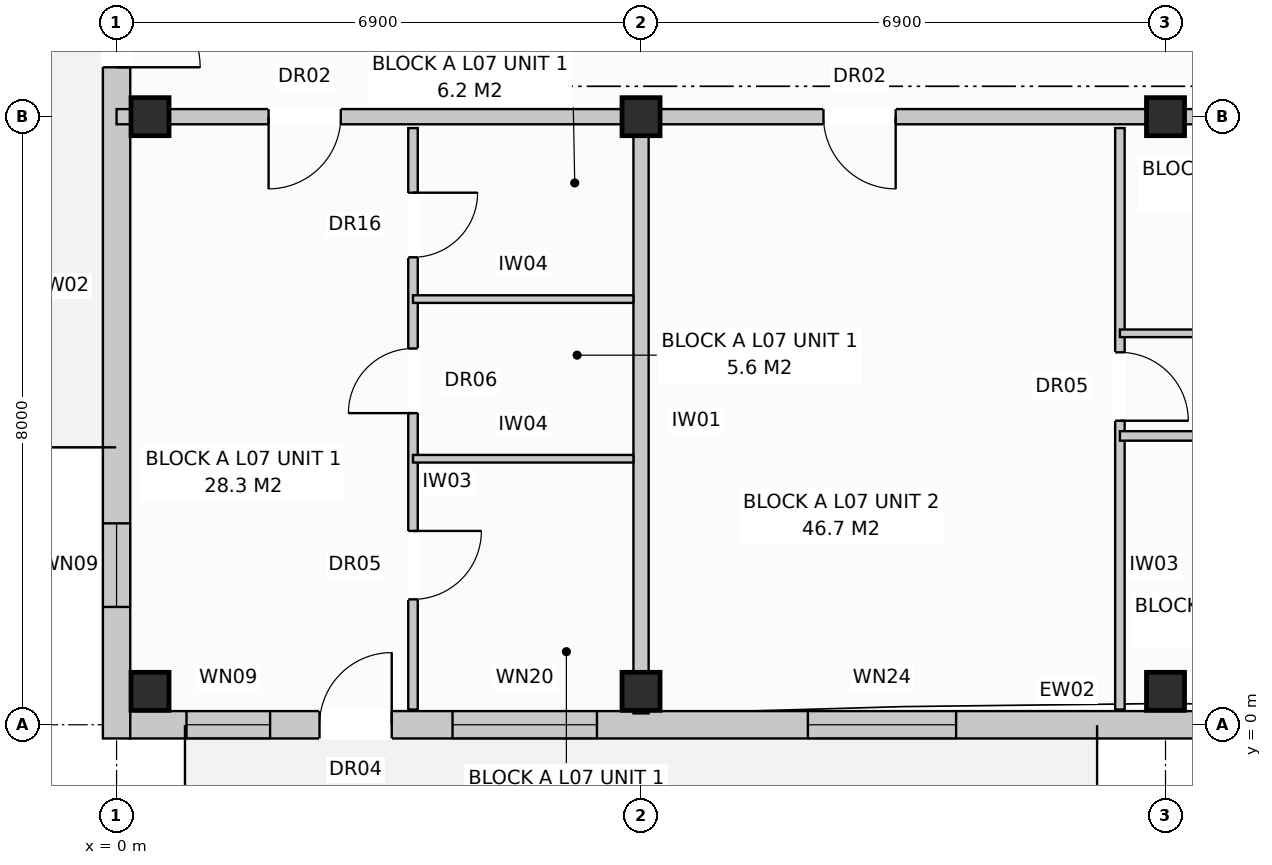
"""IFC4 building model, lengths in metres.
Left out: names, types, materials, properties, quantities, classifications, styles, units other than length and angle.
Written with IfcOpenShell. Run it as: python <this file> out.ifc"""

import sys

from ifc_helpers import new_model, si_unit, direction, frame, frame_2d, origin, origin_with_axes, origin_2d, place, context, subcontext, project, spatial, rectangle, extrude, element, fill, save


model = new_model("IFC4")
c1 = context("Model", 3, precision=1e-05, world=origin(), true_north=direction((0.0, 1.0)))
c2 = subcontext(c1, "Body", "Model", "MODEL_VIEW")
j1 = project(units=[si_unit("LENGTHUNIT", "METRE"), si_unit("PLANEANGLEUNIT", "RADIAN")], contexts=[c1])
p1 = place(None, origin())
s1 = spatial("IfcSite", under=j1, at=p1, CompositionType="ELEMENT")
p2 = place(p1, origin())
s2 = spatial("IfcBuilding", under=s1, at=p2, CompositionType="ELEMENT")
p3 = place(p2, frame((0.0, 0.0, 24.0)))
s3 = spatial("IfcBuildingStorey", under=s2, at=p3, CompositionType="ELEMENT", Elevation=24.0)
for number, where, z_axis, x_axis in (
    (1, (0.44, 0.44, 0.0), (0.0, 0.0, 1.0), (1.0, 0.0, 0.0)),
    (2, (0.44, 8.0, 0.0), (0.0, 0.0, 1.0), (1.0, 0.0, 0.0)),
    (3, (6.9, 0.44, 0.0), (0.0, 0.0, 1.0), (1.0, 0.0, 0.0)),
    (4, (6.9, 8.0, 0.0), (0.0, 0.0, 1.0), (1.0, 0.0, 0.0)),
    (5, (13.8, 0.44, 0.0), (0.0, 0.0, 1.0), (1.0, 0.0, 0.0)),
    (6, (13.8, 8.0, 0.0), (0.0, 0.0, 1.0), (1.0, 0.0, 0.0)),
):
    element("IfcColumn", number, at=place(p3, frame(where, z_axis=z_axis, x_axis=x_axis)), inside=s3, PredefinedType="COLUMN", context=c2, shape_type="SweptSolid", body=[
        extrude(rectangle(XDim=0.5, YDim=0.5, at=origin_2d()), origin(), (0.0, 0.0, 1.0), 3.2),
    ])
p4 = place(p3, frame((0.17, 0.0, 0.0), z_axis=(0.0, 0.0, 1.0), x_axis=(1.0, 0.0, 0.0)))
e7 = element("IfcWall", 7, at=p4, inside=s3, PredefinedType="STANDARD", context=c2, shape_type="SweptSolid", body=[
    extrude(rectangle(XDim=54.86, YDim=0.36, at=frame_2d((27.43, 0.0))), origin(), (0.0, 0.0, 1.0), 2.95),
])
p5 = place(p4, frame((2.5, 0.0, 0.0)))
e8 = element("IfcOpeningElement", 8, at=p5, cuts=e7, PredefinedType="OPENING", context=c2, shape_type="SweptSolid", body=[
    extrude(rectangle(XDim=0.95, YDim=2.1, at=frame_2d((0.475, 1.05))), frame((0.0, 0.192, 0.0), z_axis=(0.0, -1.0, 0.0), x_axis=(1.0, 0.0, 0.0)), (0.0, 0.0, 1.0), 0.384),
])
p6 = place(p4, frame((17.0, 0.0, 0.0)))
e9 = element("IfcOpeningElement", 9, at=p6, cuts=e7, PredefinedType="OPENING", context=c2, shape_type="SweptSolid", body=[
    extrude(rectangle(XDim=0.95, YDim=2.1, at=frame_2d((0.475, 1.05))), frame((0.0, 0.192, 0.0), z_axis=(0.0, -1.0, 0.0), x_axis=(1.0, 0.0, 0.0)), (0.0, 0.0, 1.0), 0.384),
])
p7 = place(p4, frame((30.1, 0.0, 0.0)))
e10 = element("IfcOpeningElement", 10, at=p7, cuts=e7, PredefinedType="OPENING", context=c2, shape_type="SweptSolid", body=[
    extrude(rectangle(XDim=0.95, YDim=2.1, at=frame_2d((0.475, 1.05))), frame((0.0, 0.192, 0.0), z_axis=(0.0, -1.0, 0.0), x_axis=(1.0, 0.0, 0.0)), (0.0, 0.0, 1.0), 0.384),
])
p8 = place(p4, frame((46.5, 0.0, 0.0)))
e11 = element("IfcOpeningElement", 11, at=p8, cuts=e7, PredefinedType="OPENING", context=c2, shape_type="SweptSolid", body=[
    extrude(rectangle(XDim=0.95, YDim=2.1, at=frame_2d((0.475, 1.05))), frame((0.0, 0.192, 0.0), z_axis=(0.0, -1.0, 0.0), x_axis=(1.0, 0.0, 0.0)), (0.0, 0.0, 1.0), 0.384),
])
p9 = place(p4, frame((0.75, 0.0, 0.72)))
e12 = element("IfcOpeningElement", 12, at=p9, cuts=e7, PredefinedType="OPENING", context=c2, shape_type="SweptSolid", body=[
    extrude(rectangle(XDim=1.1, YDim=1.5, at=frame_2d((0.55, 0.75))), frame((0.0, 0.192, 0.0), z_axis=(0.0, -1.0, 0.0), x_axis=(1.0, 0.0, 0.0)), (0.0, 0.0, 1.0), 0.384),
])
p10 = place(p4, frame((4.25, 0.0, 0.72)))
e13 = element("IfcOpeningElement", 13, at=p10, cuts=e7, PredefinedType="OPENING", context=c2, shape_type="SweptSolid", body=[
    extrude(rectangle(XDim=1.9, YDim=1.85, at=frame_2d((0.95, 0.925))), frame((0.0, 0.192, 0.0), z_axis=(0.0, -1.0, 0.0), x_axis=(1.0, 0.0, 0.0)), (0.0, 0.0, 1.0), 0.384),
])
p11 = place(p4, frame((8.925, 0.0, 0.8)))
e14 = element("IfcOpeningElement", 14, at=p11, cuts=e7, PredefinedType="OPENING", context=c2, shape_type="SweptSolid", body=[
    extrude(rectangle(XDim=1.95, YDim=1.65, at=frame_2d((0.975, 0.825))), frame((0.0, 0.192, 0.0), z_axis=(0.0, -1.0, 0.0), x_axis=(1.0, 0.0, 0.0)), (0.0, 0.0, 1.0), 0.384),
])
p12 = place(p4, frame((15.05, 0.0, 0.72)))
e15 = element("IfcOpeningElement", 15, at=p12, cuts=e7, PredefinedType="OPENING", context=c2, shape_type="SweptSolid", body=[
    extrude(rectangle(XDim=1.1, YDim=1.5, at=frame_2d((0.55, 0.75))), frame((0.0, 0.192, 0.0), z_axis=(0.0, -1.0, 0.0), x_axis=(1.0, 0.0, 0.0)), (0.0, 0.0, 1.0), 0.384),
])
p13 = place(p4, frame((21.05, 0.0, 0.72)))
e16 = element("IfcOpeningElement", 16, at=p13, cuts=e7, PredefinedType="OPENING", context=c2, shape_type="SweptSolid", body=[
    extrude(rectangle(XDim=1.9, YDim=1.85, at=frame_2d((0.95, 0.925))), frame((0.0, 0.192, 0.0), z_axis=(0.0, -1.0, 0.0), x_axis=(1.0, 0.0, 0.0)), (0.0, 0.0, 1.0), 0.384),
])
p14 = place(p4, frame((24.85, 0.0, 0.72)))
e17 = element("IfcOpeningElement", 17, at=p14, cuts=e7, PredefinedType="OPENING", context=c2, shape_type="SweptSolid", body=[
    extrude(rectangle(XDim=1.1, YDim=1.5, at=frame_2d((0.55, 0.75))), frame((0.0, 0.192, 0.0), z_axis=(0.0, -1.0, 0.0), x_axis=(1.0, 0.0, 0.0)), (0.0, 0.0, 1.0), 0.384),
])
p15 = place(p4, frame((28.35, 0.0, 0.72)))
e18 = element("IfcOpeningElement", 18, at=p15, cuts=e7, PredefinedType="OPENING", context=c2, shape_type="SweptSolid", body=[
    extrude(rectangle(XDim=1.1, YDim=1.5, at=frame_2d((0.55, 0.75))), frame((0.0, 0.192, 0.0), z_axis=(0.0, -1.0, 0.0), x_axis=(1.0, 0.0, 0.0)), (0.0, 0.0, 1.0), 0.384),
])
p16 = place(p4, frame((31.85, 0.0, 0.72)))
e19 = element("IfcOpeningElement", 19, at=p16, cuts=e7, PredefinedType="OPENING", context=c2, shape_type="SweptSolid", body=[
    extrude(rectangle(XDim=1.9, YDim=1.85, at=frame_2d((0.95, 0.925))), frame((0.0, 0.192, 0.0), z_axis=(0.0, -1.0, 0.0), x_axis=(1.0, 0.0, 0.0)), (0.0, 0.0, 1.0), 0.384),
])
p17 = place(p4, frame((35.525, 0.0, 0.8)))
e20 = element("IfcOpeningElement", 20, at=p17, cuts=e7, PredefinedType="OPENING", context=c2, shape_type="SweptSolid", body=[
    extrude(rectangle(XDim=1.95, YDim=1.65, at=frame_2d((0.975, 0.825))), frame((0.0, 0.192, 0.0), z_axis=(0.0, -1.0, 0.0), x_axis=(1.0, 0.0, 0.0)), (0.0, 0.0, 1.0), 0.384),
])
p18 = place(p4, frame((39.25, 0.0, 0.72)))
e21 = element("IfcOpeningElement", 21, at=p18, cuts=e7, PredefinedType="OPENING", context=c2, shape_type="SweptSolid", body=[
    extrude(rectangle(XDim=1.1, YDim=1.5, at=frame_2d((0.55, 0.75))), frame((0.0, 0.192, 0.0), z_axis=(0.0, -1.0, 0.0), x_axis=(1.0, 0.0, 0.0)), (0.0, 0.0, 1.0), 0.384),
])
p19 = place(p4, frame((42.45, 0.0, 0.8)))
e22 = element("IfcOpeningElement", 22, at=p19, cuts=e7, PredefinedType="OPENING", context=c2, shape_type="SweptSolid", body=[
    extrude(rectangle(XDim=1.9, YDim=1.85, at=frame_2d((0.95, 0.925))), frame((0.0, 0.192, 0.0), z_axis=(0.0, -1.0, 0.0), x_axis=(1.0, 0.0, 0.0)), (0.0, 0.0, 1.0), 0.384),
])
p20 = place(p4, frame((48.7, 0.0, 0.9)))
e23 = element("IfcOpeningElement", 23, at=p20, cuts=e7, PredefinedType="OPENING", context=c2, shape_type="SweptSolid", body=[
    extrude(rectangle(XDim=0.95, YDim=1.55, at=frame_2d((0.475, 0.775))), frame((0.0, 0.192, 0.0), z_axis=(0.0, -1.0, 0.0), x_axis=(1.0, 0.0, 0.0)), (0.0, 0.0, 1.0), 0.384),
])
p21 = place(p4, frame((51.5, 0.0, 0.8)))
e24 = element("IfcOpeningElement", 24, at=p21, cuts=e7, PredefinedType="OPENING", context=c2, shape_type="SweptSolid", body=[
    extrude(rectangle(XDim=1.8, YDim=1.7, at=frame_2d((0.9, 0.85))), frame((0.0, 0.192, 0.0), z_axis=(0.0, -1.0, 0.0), x_axis=(1.0, 0.0, 0.0)), (0.0, 0.0, 1.0), 0.384),
])
p22 = place(p3, frame((0.0, -0.18, 0.0), z_axis=(0.0, 0.0, 1.0), x_axis=(0.0, 1.0, 0.0)))
e25 = element("IfcWall", 25, at=p22, inside=s3, PredefinedType="STANDARD", context=c2, shape_type="SweptSolid", body=[
    extrude(rectangle(XDim=18.76, YDim=0.36, at=frame_2d((9.38, 0.0))), origin(), (0.0, 0.0, 1.0), 2.95),
])
p23 = place(p22, frame((8.83, 0.0, 0.0)))
e26 = element("IfcOpeningElement", 26, at=p23, cuts=e25, PredefinedType="OPENING", context=c2, shape_type="SweptSolid", body=[
    extrude(rectangle(XDim=1.1, YDim=2.1, at=frame_2d((0.55, 1.05))), frame((0.0, 0.192, 0.0), z_axis=(0.0, -1.0, 0.0), x_axis=(1.0, 0.0, 0.0)), (0.0, 0.0, 1.0), 0.384),
])
p24 = place(p22, frame((1.73, 0.0, 0.72)))
e27 = element("IfcOpeningElement", 27, at=p24, cuts=e25, PredefinedType="OPENING", context=c2, shape_type="SweptSolid", body=[
    extrude(rectangle(XDim=1.1, YDim=1.5, at=frame_2d((0.55, 0.75))), frame((0.0, 0.192, 0.0), z_axis=(0.0, -1.0, 0.0), x_axis=(1.0, 0.0, 0.0)), (0.0, 0.0, 1.0), 0.384),
])
p25 = place(p22, frame((15.93, 0.0, 0.72)))
e28 = element("IfcOpeningElement", 28, at=p25, cuts=e25, PredefinedType="OPENING", context=c2, shape_type="SweptSolid", body=[
    extrude(rectangle(XDim=1.1, YDim=1.5, at=frame_2d((0.55, 0.75))), frame((0.0, 0.192, 0.0), z_axis=(0.0, -1.0, 0.0), x_axis=(1.0, 0.0, 0.0)), (0.0, 0.0, 1.0), 0.384),
])
p26 = place(p3, frame((6.9, 7.85, 0.0), z_axis=(0.0, 0.0, 1.0), x_axis=(0.0, -1.0, 0.0)))
e29 = element("IfcWall", 29, at=p26, inside=s3, PredefinedType="PARTITIONING", context=c2, shape_type="SweptSolid", body=[
    extrude(rectangle(XDim=7.7, YDim=0.2, at=frame_2d((3.85, 0.0))), origin(), (0.0, 0.0, 1.0), 2.39),
])
p27 = place(p3, frame((0.0, 8.0, 0.0), z_axis=(0.0, 0.0, 1.0), x_axis=(1.0, 0.0, 0.0)))
e30 = element("IfcWall", 30, at=p27, inside=s3, PredefinedType="PARTITIONING", context=c2, shape_type="SweptSolid", body=[
    extrude(rectangle(XDim=6.9, YDim=0.2, at=frame_2d((3.45, 0.0))), origin(), (0.0, 0.0, 1.0), 2.39),
])
p28 = place(p27, frame((2.0, 0.0, 0.0)))
e31 = element("IfcOpeningElement", 31, at=p28, cuts=e30, PredefinedType="OPENING", context=c2, shape_type="SweptSolid", body=[
    extrude(rectangle(XDim=0.95, YDim=2.15, at=frame_2d((0.475, 1.075))), frame((0.0, 0.112, 0.0), z_axis=(0.0, -1.0, 0.0), x_axis=(1.0, 0.0, 0.0)), (0.0, 0.0, 1.0), 0.224),
])
p29 = place(p3, frame((3.9, 7.85, 0.0), z_axis=(0.0, 0.0, 1.0), x_axis=(0.0, -1.0, 0.0)))
e32 = element("IfcWall", 32, at=p29, inside=s3, PredefinedType="PARTITIONING", context=c2, shape_type="SweptSolid", body=[
    extrude(rectangle(XDim=7.65, YDim=0.125, at=frame_2d((3.825, 0.0))), origin(), (0.0, 0.0, 1.0), 2.95),
])
p30 = place(p29, frame((0.85, 0.0, 0.0)))
e33 = element("IfcOpeningElement", 33, at=p30, cuts=e32, PredefinedType="OPENING", context=c2, shape_type="SweptSolid", body=[
    extrude(rectangle(XDim=0.85, YDim=2.1, at=frame_2d((0.425, 1.05))), frame((0.0, 0.074, 0.0), z_axis=(0.0, -1.0, 0.0), x_axis=(1.0, 0.0, 0.0)), (0.0, 0.0, 1.0), 0.149),
])
p31 = place(p29, frame((2.9, 0.0, 0.0)))
e34 = element("IfcOpeningElement", 34, at=p31, cuts=e32, PredefinedType="OPENING", context=c2, shape_type="SweptSolid", body=[
    extrude(rectangle(XDim=0.85, YDim=2.05, at=frame_2d((0.425, 1.025))), frame((0.0, 0.074, 0.0), z_axis=(0.0, -1.0, 0.0), x_axis=(1.0, 0.0, 0.0)), (0.0, 0.0, 1.0), 0.149),
])
p32 = place(p29, frame((5.3, 0.0, 0.0)))
e35 = element("IfcOpeningElement", 35, at=p32, cuts=e32, PredefinedType="OPENING", context=c2, shape_type="SweptSolid", body=[
    extrude(rectangle(XDim=0.9, YDim=2.1, at=frame_2d((0.45, 1.05))), frame((0.0, 0.074, 0.0), z_axis=(0.0, -1.0, 0.0), x_axis=(1.0, 0.0, 0.0)), (0.0, 0.0, 1.0), 0.149),
])
for number, where, z_axis, x_axis in (
    (36, (3.9, 5.6, 0.0), (0.0, 0.0, 1.0), (1.0, 0.0, 0.0)),
    (37, (3.9, 3.5, 0.0), (0.0, 0.0, 1.0), (1.0, 0.0, 0.0)),
):
    element("IfcWall", number, at=place(p3, frame(where, z_axis=z_axis, x_axis=x_axis)), inside=s3, PredefinedType="PARTITIONING", context=c2, shape_type="SweptSolid", body=[
        extrude(rectangle(XDim=2.9, YDim=0.1, at=frame_2d((1.45, 0.0))), origin(), (0.0, 0.0, 1.0), 2.95),
    ])
p33 = place(p3, frame((6.9, 8.0, 0.0), z_axis=(0.0, 0.0, 1.0), x_axis=(1.0, 0.0, 0.0)))
e38 = element("IfcWall", 38, at=p33, inside=s3, PredefinedType="PARTITIONING", context=c2, shape_type="SweptSolid", body=[
    extrude(rectangle(XDim=20.7, YDim=0.2, at=frame_2d((10.35, 0.0))), origin(), (0.0, 0.0, 1.0), 2.39),
])
p34 = place(p33, frame((2.4, 0.0, 0.0)))
e39 = element("IfcOpeningElement", 39, at=p34, cuts=e38, PredefinedType="OPENING", context=c2, shape_type="SweptSolid", body=[
    extrude(rectangle(XDim=0.95, YDim=2.15, at=frame_2d((0.475, 1.075))), frame((0.0, 0.112, 0.0), z_axis=(0.0, -1.0, 0.0), x_axis=(1.0, 0.0, 0.0)), (0.0, 0.0, 1.0), 0.224),
])
p35 = place(p3, frame((13.2, 7.85, 0.0), z_axis=(0.0, 0.0, 1.0), x_axis=(0.0, -1.0, 0.0)))
e40 = element("IfcWall", 40, at=p35, inside=s3, PredefinedType="PARTITIONING", context=c2, shape_type="SweptSolid", body=[
    extrude(rectangle(XDim=7.65, YDim=0.125, at=frame_2d((3.825, 0.0))), origin(), (0.0, 0.0, 1.0), 2.59),
])
p36 = place(p35, frame((2.95, 0.0, 0.0)))
e41 = element("IfcOpeningElement", 41, at=p36, cuts=e40, PredefinedType="OPENING", context=c2, shape_type="SweptSolid", body=[
    extrude(rectangle(XDim=0.9, YDim=2.1, at=frame_2d((0.45, 1.05))), frame((0.0, 0.074, 0.0), z_axis=(0.0, -1.0, 0.0), x_axis=(1.0, 0.0, 0.0)), (0.0, 0.0, 1.0), 0.149),
])
p37 = place(p3, frame((13.2, 5.15, 0.0), z_axis=(0.0, 0.0, 1.0), x_axis=(1.0, 0.0, 0.0)))
e42 = element("IfcWall", 42, at=p37, inside=s3, PredefinedType="PARTITIONING", context=c2, shape_type="SweptSolid", body=[
    extrude(rectangle(XDim=14.3, YDim=0.1, at=frame_2d((7.15, 0.0))), origin(), (0.0, 0.0, 1.0), 2.95),
])
p38 = place(p37, frame((1.6, 0.0, 0.0)))
e43 = element("IfcOpeningElement", 43, at=p38, cuts=e42, PredefinedType="OPENING", context=c2, shape_type="SweptSolid", body=[
    extrude(rectangle(XDim=0.9, YDim=2.1, at=frame_2d((0.45, 1.05))), frame((0.0, 0.062, 0.0), z_axis=(0.0, -1.0, 0.0), x_axis=(1.0, 0.0, 0.0)), (0.0, 0.0, 1.0), 0.124),
])
p39 = place(p37, frame((5.1, 0.0, 0.0)))
e44 = element("IfcOpeningElement", 44, at=p39, cuts=e42, PredefinedType="OPENING", context=c2, shape_type="SweptSolid", body=[
    extrude(rectangle(XDim=0.85, YDim=2.05, at=frame_2d((0.425, 1.025))), frame((0.0, 0.062, 0.0), z_axis=(0.0, -1.0, 0.0), x_axis=(1.0, 0.0, 0.0)), (0.0, 0.0, 1.0), 0.124),
])
p40 = place(p37, frame((8.2, 0.0, 0.0)))
e45 = element("IfcOpeningElement", 45, at=p40, cuts=e42, PredefinedType="OPENING", context=c2, shape_type="SweptSolid", body=[
    extrude(rectangle(XDim=0.85, YDim=2.05, at=frame_2d((0.425, 1.025))), frame((0.0, 0.062, 0.0), z_axis=(0.0, -1.0, 0.0), x_axis=(1.0, 0.0, 0.0)), (0.0, 0.0, 1.0), 0.124),
])
p41 = place(p37, frame((11.6, 0.0, 0.0)))
e46 = element("IfcOpeningElement", 46, at=p41, cuts=e42, PredefinedType="OPENING", context=c2, shape_type="SweptSolid", body=[
    extrude(rectangle(XDim=0.85, YDim=2.05, at=frame_2d((0.425, 1.025))), frame((0.0, 0.062, 0.0), z_axis=(0.0, -1.0, 0.0), x_axis=(1.0, 0.0, 0.0)), (0.0, 0.0, 1.0), 0.124),
])
p42 = place(p3, frame((13.2, 3.8, 0.0), z_axis=(0.0, 0.0, 1.0), x_axis=(1.0, 0.0, 0.0)))
e47 = element("IfcWall", 47, at=p42, inside=s3, PredefinedType="PARTITIONING", context=c2, shape_type="SweptSolid", body=[
    extrude(rectangle(XDim=10.4, YDim=0.125, at=frame_2d((5.2, 0.0))), origin(), (0.0, 0.0, 1.0), 2.95),
])
p43 = place(p42, frame((2.0, 0.0, 0.0)))
e48 = element("IfcOpeningElement", 48, at=p43, cuts=e47, PredefinedType="OPENING", context=c2, shape_type="SweptSolid", body=[
    extrude(rectangle(XDim=0.9, YDim=2.1, at=frame_2d((0.45, 1.05))), frame((0.0, 0.074, 0.0), z_axis=(0.0, -1.0, 0.0), x_axis=(1.0, 0.0, 0.0)), (0.0, 0.0, 1.0), 0.149),
])
p44 = place(p42, frame((7.2, 0.0, 0.0)))
e49 = element("IfcOpeningElement", 49, at=p44, cuts=e47, PredefinedType="OPENING", context=c2, shape_type="SweptSolid", body=[
    extrude(rectangle(XDim=0.9, YDim=2.1, at=frame_2d((0.45, 1.05))), frame((0.0, 0.074, 0.0), z_axis=(0.0, -1.0, 0.0), x_axis=(1.0, 0.0, 0.0)), (0.0, 0.0, 1.0), 0.149),
])
p45 = place(p5, origin_with_axes())
e50 = element("IfcDoor", 50, at=p45, inside=s3, OperationType="SINGLE_SWING_RIGHT", PredefinedType="DOOR", context=c2, shape_type="SweptSolid", body=[
    extrude(rectangle(XDim=0.95, YDim=2.1, at=frame_2d((0.475, 1.05))), frame((0.0, 0.025, 0.0), z_axis=(0.0, -1.0, 0.0), x_axis=(1.0, 0.0, 0.0)), (0.0, 0.0, 1.0), 0.05),
])
fill(e8, e50)
p46 = place(p9, origin_with_axes())
e51 = element("IfcWindow", 51, at=p46, inside=s3, PartitioningType="SINGLE_PANEL", PredefinedType="WINDOW", context=c2, shape_type="SweptSolid", body=[
    extrude(rectangle(XDim=1.1, YDim=1.5, at=frame_2d((0.55, 0.75))), frame((0.0, 0.03, 0.0), z_axis=(0.0, -1.0, 0.0), x_axis=(1.0, 0.0, 0.0)), (0.0, 0.0, 1.0), 0.06),
])
fill(e12, e51)
p47 = place(p10, origin_with_axes())
e52 = element("IfcWindow", 52, at=p47, inside=s3, PartitioningType="SINGLE_PANEL", PredefinedType="WINDOW", context=c2, shape_type="SweptSolid", body=[
    extrude(rectangle(XDim=1.9, YDim=1.85, at=frame_2d((0.95, 0.925))), frame((0.0, 0.03, 0.0), z_axis=(0.0, -1.0, 0.0), x_axis=(1.0, 0.0, 0.0)), (0.0, 0.0, 1.0), 0.06),
])
fill(e13, e52)
p48 = place(p11, origin_with_axes())
e53 = element("IfcWindow", 53, at=p48, inside=s3, PartitioningType="SINGLE_PANEL", PredefinedType="WINDOW", context=c2, shape_type="SweptSolid", body=[
    extrude(rectangle(XDim=1.95, YDim=1.65, at=frame_2d((0.975, 0.825))), frame((0.0, 0.03, 0.0), z_axis=(0.0, -1.0, 0.0), x_axis=(1.0, 0.0, 0.0)), (0.0, 0.0, 1.0), 0.06),
])
fill(e14, e53)
p49 = place(p23, frame((1.1, 0.0, 0.0), z_axis=(0.0, 0.0, 1.0), x_axis=(-1.0, 0.0, 0.0)))
e54 = element("IfcDoor", 54, at=p49, inside=s3, OperationType="SINGLE_SWING_LEFT", PredefinedType="DOOR", context=c2, shape_type="SweptSolid", body=[
    extrude(rectangle(XDim=1.1, YDim=2.1, at=frame_2d((0.55, 1.05))), frame((0.0, 0.025, 0.0), z_axis=(0.0, -1.0, 0.0), x_axis=(1.0, 0.0, 0.0)), (0.0, 0.0, 1.0), 0.05),
])
fill(e26, e54)
p50 = place(p24, origin_with_axes())
e55 = element("IfcWindow", 55, at=p50, inside=s3, PartitioningType="SINGLE_PANEL", PredefinedType="WINDOW", context=c2, shape_type="SweptSolid", body=[
    extrude(rectangle(XDim=1.1, YDim=1.5, at=frame_2d((0.55, 0.75))), frame((0.0, 0.03, 0.0), z_axis=(0.0, -1.0, 0.0), x_axis=(1.0, 0.0, 0.0)), (0.0, 0.0, 1.0), 0.06),
])
fill(e27, e55)
p51 = place(p28, frame((0.95, 0.0, 0.0), z_axis=(0.0, 0.0, 1.0), x_axis=(-1.0, 0.0, 0.0)))
e56 = element("IfcDoor", 56, at=p51, inside=s3, OperationType="SINGLE_SWING_LEFT", PredefinedType="DOOR", context=c2, shape_type="SweptSolid", body=[
    extrude(rectangle(XDim=0.95, YDim=2.15, at=frame_2d((0.475, 1.075))), frame((0.0, 0.025, 0.0), z_axis=(0.0, -1.0, 0.0), x_axis=(1.0, 0.0, 0.0)), (0.0, 0.0, 1.0), 0.05),
])
fill(e31, e56)
p52 = place(p30, origin_with_axes())
e57 = element("IfcDoor", 57, at=p52, inside=s3, OperationType="SINGLE_SWING_LEFT", PredefinedType="DOOR", context=c2, shape_type="SweptSolid", body=[
    extrude(rectangle(XDim=0.85, YDim=2.1, at=frame_2d((0.425, 1.05))), frame((0.0, 0.025, 0.0), z_axis=(0.0, -1.0, 0.0), x_axis=(1.0, 0.0, 0.0)), (0.0, 0.0, 1.0), 0.05),
])
fill(e33, e57)
p53 = place(p31, frame((0.85, 0.0, 0.0), z_axis=(0.0, 0.0, 1.0), x_axis=(-1.0, 0.0, 0.0)))
e58 = element("IfcDoor", 58, at=p53, inside=s3, OperationType="SINGLE_SWING_RIGHT", PredefinedType="DOOR", context=c2, shape_type="SweptSolid", body=[
    extrude(rectangle(XDim=0.85, YDim=2.05, at=frame_2d((0.425, 1.025))), frame((0.0, 0.025, 0.0), z_axis=(0.0, -1.0, 0.0), x_axis=(1.0, 0.0, 0.0)), (0.0, 0.0, 1.0), 0.05),
])
fill(e34, e58)
p54 = place(p32, origin_with_axes())
e59 = element("IfcDoor", 59, at=p54, inside=s3, OperationType="SINGLE_SWING_LEFT", PredefinedType="DOOR", context=c2, shape_type="SweptSolid", body=[
    extrude(rectangle(XDim=0.9, YDim=2.1, at=frame_2d((0.45, 1.05))), frame((0.0, 0.025, 0.0), z_axis=(0.0, -1.0, 0.0), x_axis=(1.0, 0.0, 0.0)), (0.0, 0.0, 1.0), 0.05),
])
fill(e35, e59)
p55 = place(p34, frame((0.95, 0.0, 0.0), z_axis=(0.0, 0.0, 1.0), x_axis=(-1.0, 0.0, 0.0)))
e60 = element("IfcDoor", 60, at=p55, inside=s3, OperationType="SINGLE_SWING_RIGHT", PredefinedType="DOOR", context=c2, shape_type="SweptSolid", body=[
    extrude(rectangle(XDim=0.95, YDim=2.15, at=frame_2d((0.475, 1.075))), frame((0.0, 0.025, 0.0), z_axis=(0.0, -1.0, 0.0), x_axis=(1.0, 0.0, 0.0)), (0.0, 0.0, 1.0), 0.05),
])
fill(e39, e60)
p56 = place(p36, origin_with_axes())
e61 = element("IfcDoor", 61, at=p56, inside=s3, OperationType="SINGLE_SWING_RIGHT", PredefinedType="DOOR", context=c2, shape_type="SweptSolid", body=[
    extrude(rectangle(XDim=0.9, YDim=2.1, at=frame_2d((0.45, 1.05))), frame((0.0, 0.025, 0.0), z_axis=(0.0, -1.0, 0.0), x_axis=(1.0, 0.0, 0.0)), (0.0, 0.0, 1.0), 0.05),
])
fill(e41, e61)
save(model, sys.argv[1])
